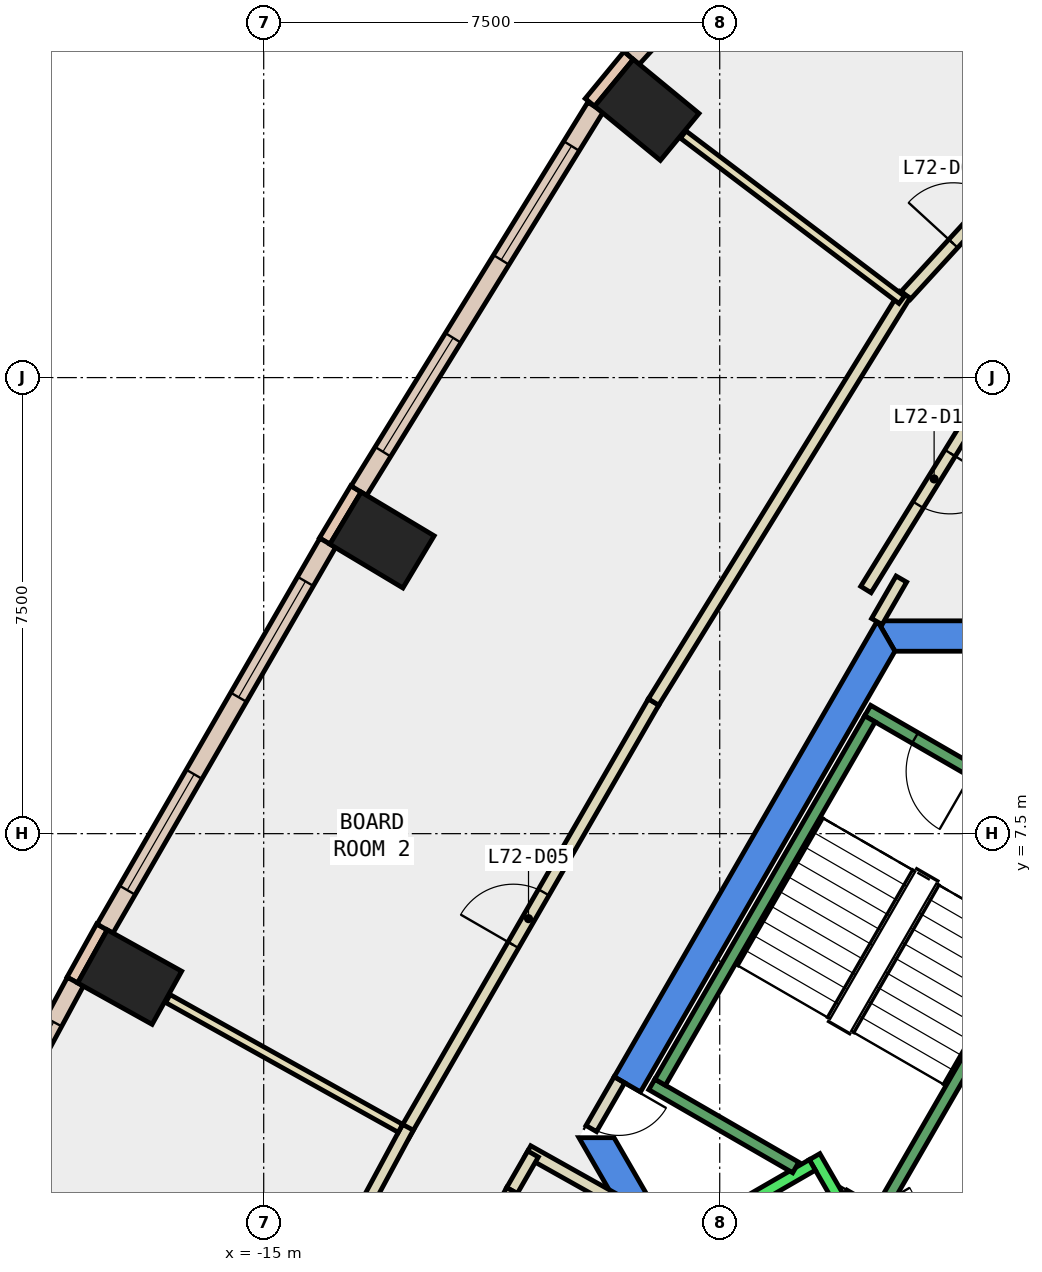
"""IFC4 building model, lengths in metres.
Left out: names, types, materials, properties, quantities, classifications, styles, units other than length and angle.
Written with IfcOpenShell. Run it as: python <this file> out.ifc"""

import sys

from ifc_helpers import new_model, si_unit, direction, frame, frame_2d, origin, origin_2d, place, context, subcontext, project, spatial, polyline, rectangle, outline, extrude, element, fill, save


model = new_model("IFC4")
c1 = context("Model", 3, precision=1e-05, world=origin(), true_north=direction((0.0, 1.0)))
c2 = subcontext(c1, "Body", "Model", "MODEL_VIEW")
j1 = project(units=[si_unit("LENGTHUNIT", "METRE"), si_unit("PLANEANGLEUNIT", "RADIAN")], contexts=[c1])
p1 = place(None, origin())
s1 = spatial("IfcSite", under=j1, at=p1, CompositionType="ELEMENT")
p2 = place(p1, origin())
s2 = spatial("IfcBuilding", under=s1, at=p2, CompositionType="ELEMENT")
p3 = place(p2, frame((0.0, 0.0, 308.0)))
s3 = spatial("IfcBuildingStorey", under=s2, at=p3, CompositionType="ELEMENT", Elevation=308.0)
for number, where, z_axis, x_axis in (
    (1, (-8.699, 19.403, -0.34), (0.0, 0.0, 1.0), (0.636, 0.772, 0.0)),
    (2, (-13.054, 12.329, -0.34), (0.0, 0.0, 1.0), (0.514, 0.858, 0.0)),
    (3, (-17.204, 5.141, -0.34), (0.0, 0.0, 1.0), (0.486, 0.874, 0.0)),
):
    element("IfcColumn", number, at=place(p3, frame(where, z_axis=z_axis, x_axis=x_axis)), inside=s3, PredefinedType="COLUMN", context=c2, shape_type="SweptSolid", body=[
        extrude(rectangle(XDim=1.0, YDim=1.4, at=origin_2d()), origin(), (0.0, 0.0, 1.0), 3.6),
    ])
p4 = place(p3, frame((0.0, 0.0, -0.34)))
e4 = element("IfcWall", 4, at=p4, inside=s3, PredefinedType="SHEAR", context=c2, shape_type="SweptSolid", body=[
    extrude(outline(polyline([(4.907, 11.0), (-4.907, 11.0), (-4.619, 10.5), (4.619, 10.5), (4.907, 11.0)])), origin(), (0.0, 0.0, 1.0), 3.6),
])
p5 = place(p3, frame((0.0, 0.0, -0.34)))
e5 = element("IfcWall", 5, at=p5, inside=s3, PredefinedType="SHEAR", context=c2, shape_type="SweptSolid", body=[
    extrude(outline(polyline([(-9.236, 3.502), (-8.803, 3.253), (-4.619, 10.5), (-4.907, 11.0), (-9.236, 3.502)])), origin(), (0.0, 0.0, 1.0), 3.6),
])
p6 = place(p3, frame((0.0, 0.0, -0.34)))
e6 = element("IfcWall", 6, at=p6, inside=s3, PredefinedType="SHEAR", context=c2, shape_type="SweptSolid", body=[
    extrude(outline(polyline([(-9.815, 2.5), (-4.907, -6.0), (-4.619, -5.5), (-9.238, 2.5), (-9.815, 2.5)])), origin(), (0.0, 0.0, 1.0), 3.6),
])
p7 = place(p3, frame((-8.999, 20.297, 0.0), z_axis=(0.0, 0.0, 1.0), x_axis=(-0.6357329148, -0.77190910154, 0.0)))
e7 = element("IfcWall", 7, at=p7, inside=s3, PredefinedType="STANDARD", context=c2, shape_type="SweptSolid", body=[
    extrude(rectangle(XDim=1.0, YDim=0.2, at=frame_2d((0.5, 0.0))), origin(), (0.0, 0.0, 1.0), 3.26),
])
p8 = place(p3, frame((-13.483, 13.17, 0.0), z_axis=(0.0, 0.0, 1.0), x_axis=(-0.514064933905, -0.857751271482, 0.0)))
e8 = element("IfcWall", 8, at=p8, inside=s3, PredefinedType="STANDARD", context=c2, shape_type="SweptSolid", body=[
    extrude(rectangle(XDim=1.0, YDim=0.2, at=frame_2d((0.5, 0.0))), origin(), (0.0, 0.0, 1.0), 3.26),
])
p9 = place(p3, frame((-17.661, 5.966, 0.0), z_axis=(0.0, 0.0, 1.0), x_axis=(-0.486036693078, -0.873938403425, 0.0)))
e9 = element("IfcWall", 9, at=p9, inside=s3, PredefinedType="STANDARD", context=c2, shape_type="SweptSolid", body=[
    extrude(rectangle(XDim=1.0, YDim=0.2, at=frame_2d((0.5, 0.0))), origin(), (0.0, 0.0, 1.0), 3.26),
])
p10 = place(p3, frame((-5.898, 23.566, 0.0), z_axis=(0.0, 0.0, 1.0), x_axis=(-0.675798306171, -0.737086595575, 0.0)))
e10 = element("IfcWall", 10, at=p10, inside=s3, PredefinedType="STANDARD", context=c2, shape_type="SweptSolid", body=[
    extrude(rectangle(XDim=4.501, YDim=0.3, at=frame_2d((2.25, 0.0))), origin(), (0.0, 0.0, 1.0), 3.26),
])
p11 = place(p10, frame((1.551, 0.0, 0.9)))
e11 = element("IfcOpeningElement", 11, at=p11, cuts=e10, PredefinedType="OPENING", context=c2, shape_type="SweptSolid", body=[
    extrude(rectangle(XDim=1.4, YDim=2.0, at=frame_2d((0.7, 1.0))), frame((0.0, 0.16, 0.0), z_axis=(0.0, -1.0, 0.0), x_axis=(1.0, 0.0, 0.0)), (0.0, 0.0, 1.0), 0.32),
])
p12 = place(p3, frame((-9.542, 19.45, 0.0), z_axis=(0.0, 0.0, 1.0), x_axis=(-0.525070792614, -0.851058554239, 0.0)))
e12 = element("IfcWall", 12, at=p12, inside=s3, PredefinedType="STANDARD", context=c2, shape_type="SweptSolid", body=[
    extrude(rectangle(XDim=7.414, YDim=0.3, at=frame_2d((3.707, 0.0))), origin(), (0.0, 0.0, 1.0), 3.26),
])
p13 = place(p12, frame((0.754, 0.0, 0.9)))
e13 = element("IfcOpeningElement", 13, at=p13, cuts=e12, PredefinedType="OPENING", context=c2, shape_type="SweptSolid", body=[
    extrude(rectangle(XDim=2.2, YDim=2.0, at=frame_2d((1.1, 1.0))), frame((0.0, 0.16, 0.0), z_axis=(0.0, -1.0, 0.0), x_axis=(1.0, 0.0, 0.0)), (0.0, 0.0, 1.0), 0.32),
])
p14 = place(p12, frame((4.461, 0.0, 0.9)))
e14 = element("IfcOpeningElement", 14, at=p14, cuts=e12, PredefinedType="OPENING", context=c2, shape_type="SweptSolid", body=[
    extrude(rectangle(XDim=2.2, YDim=2.0, at=frame_2d((1.1, 1.0))), frame((0.0, 0.16, 0.0), z_axis=(0.0, -1.0, 0.0), x_axis=(1.0, 0.0, 0.0)), (0.0, 0.0, 1.0), 0.32),
])
p15 = place(p3, frame((-13.947, 12.283, 0.0), z_axis=(0.0, 0.0, 1.0), x_axis=(-0.499923391538, -0.866069629183, 0.0)))
e15 = element("IfcWall", 15, at=p15, inside=s3, PredefinedType="STANDARD", context=c2, shape_type="SweptSolid", body=[
    extrude(rectangle(XDim=7.327, YDim=0.3, at=frame_2d((3.664, 0.0))), origin(), (0.0, 0.0, 1.0), 3.26),
])
p16 = place(p15, frame((0.732, 0.0, 0.9)))
e16 = element("IfcOpeningElement", 16, at=p16, cuts=e15, PredefinedType="OPENING", context=c2, shape_type="SweptSolid", body=[
    extrude(rectangle(XDim=2.2, YDim=2.0, at=frame_2d((1.1, 1.0))), frame((0.0, 0.16, 0.0), z_axis=(0.0, -1.0, 0.0), x_axis=(1.0, 0.0, 0.0)), (0.0, 0.0, 1.0), 0.32),
])
p17 = place(p15, frame((4.395, 0.0, 0.9)))
e17 = element("IfcOpeningElement", 17, at=p17, cuts=e15, PredefinedType="OPENING", context=c2, shape_type="SweptSolid", body=[
    extrude(rectangle(XDim=2.2, YDim=2.0, at=frame_2d((1.1, 1.0))), frame((0.0, 0.16, 0.0), z_axis=(0.0, -1.0, 0.0), x_axis=(1.0, 0.0, 0.0)), (0.0, 0.0, 1.0), 0.32),
])
p18 = place(p3, frame((-18.097, 5.066, 0.0), z_axis=(0.0, 0.0, 1.0), x_axis=(-0.474421773145, -0.880297666228, 0.0)))
e18 = element("IfcWall", 18, at=p18, inside=s3, PredefinedType="STANDARD", context=c2, shape_type="SweptSolid", body=[
    extrude(rectangle(XDim=7.416, YDim=0.3, at=frame_2d((3.708, 0.0))), origin(), (0.0, 0.0, 1.0), 3.26),
])
p19 = place(p18, frame((0.754, 0.0, 0.9)))
e19 = element("IfcOpeningElement", 19, at=p19, cuts=e18, PredefinedType="OPENING", context=c2, shape_type="SweptSolid", body=[
    extrude(rectangle(XDim=2.2, YDim=2.0, at=frame_2d((1.1, 1.0))), frame((0.0, 0.16, 0.0), z_axis=(0.0, -1.0, 0.0), x_axis=(1.0, 0.0, 0.0)), (0.0, 0.0, 1.0), 0.32),
])
p20 = place(p18, frame((4.462, 0.0, 0.9)))
e20 = element("IfcOpeningElement", 20, at=p20, cuts=e18, PredefinedType="OPENING", context=c2, shape_type="SweptSolid", body=[
    extrude(rectangle(XDim=2.2, YDim=2.0, at=frame_2d((1.1, 1.0))), frame((0.0, 0.16, 0.0), z_axis=(0.0, -1.0, 0.0), x_axis=(1.0, 0.0, 0.0)), (0.0, 0.0, 1.0), 0.32),
])
p21 = place(p3, frame((-2.852, 15.152, 0.0), z_axis=(0.0, 0.0, 1.0), x_axis=(-0.525050105661, -0.851071316956, 0.0)))
e21 = element("IfcWall", 21, at=p21, inside=s3, PredefinedType="PARTITIONING", context=c2, shape_type="SweptSolid", body=[
    extrude(rectangle(XDim=4.274, YDim=0.2, at=frame_2d((2.137, 0.0))), origin(), (0.0, 0.0, 1.0), 3.26),
])
p22 = place(p21, frame((1.637, 0.0, 0.0)))
e22 = element("IfcOpeningElement", 22, at=p22, cuts=e21, PredefinedType="OPENING", context=c2, shape_type="SweptSolid", body=[
    extrude(rectangle(XDim=1.0, YDim=2.1, at=frame_2d((0.5, 1.05))), frame((0.0, 0.11, 0.0), z_axis=(0.0, -1.0, 0.0), x_axis=(1.0, 0.0, 0.0)), (0.0, 0.0, 1.0), 0.22),
])
p23 = place(p3, frame((-4.513, 11.687, 0.0), z_axis=(0.0, 0.0, 1.0), x_axis=(-0.499556546863, -0.866281280235, 0.0)))
e23 = element("IfcWall", 23, at=p23, inside=s3, PredefinedType="PARTITIONING", context=c2, shape_type="SweptSolid", body=[
    extrude(rectangle(XDim=0.807, YDim=0.2, at=frame_2d((0.403, 0.0))), origin(), (0.0, 0.0, 1.0), 3.26),
])
p24 = place(p3, frame((-9.203, 1.465, 0.0), z_axis=(0.0, 0.0, 1.0), x_axis=(-0.872341127106, 0.488897696823, 0.0)))
e24 = element("IfcWall", 24, at=p24, inside=s3, PredefinedType="PARTITIONING", context=c2, shape_type="SweptSolid", body=[
    extrude(rectangle(XDim=1.667, YDim=0.2, at=frame_2d((0.833, 0.0))), origin(), (0.0, 0.0, 1.0), 3.26),
])
p25 = place(p3, frame((-10.57, 2.232, 0.0), z_axis=(0.0, 0.0, 1.0), x_axis=(-0.500037208726, -0.86600392025, 0.0)))
e25 = element("IfcWall", 25, at=p25, inside=s3, PredefinedType="PARTITIONING", context=c2, shape_type="SweptSolid", body=[
    extrude(rectangle(XDim=0.694, YDim=0.2, at=frame_2d((0.347, 0.0))), origin(), (0.0, 0.0, 1.0), 3.26),
])
p26 = place(p3, frame((-10.917, 1.631, 0.0), z_axis=(0.0, 0.0, 1.0), x_axis=(-0.47449538478, -0.880257990491, 0.0)))
e26 = element("IfcWall", 26, at=p26, inside=s3, PredefinedType="PARTITIONING", context=c2, shape_type="SweptSolid", body=[
    extrude(rectangle(XDim=7.655, YDim=0.2, at=frame_2d((3.827, 0.0))), origin(), (0.0, 0.0, 1.0), 3.26),
])
p27 = place(p26, frame((2.927, 0.0, 0.0)))
e27 = element("IfcOpeningElement", 27, at=p27, cuts=e26, PredefinedType="OPENING", context=c2, shape_type="SweptSolid", body=[
    extrude(rectangle(XDim=1.8, YDim=2.1, at=frame_2d((0.9, 1.05))), frame((0.0, 0.11, 0.0), z_axis=(0.0, -1.0, 0.0), x_axis=(1.0, 0.0, 0.0)), (0.0, 0.0, 1.0), 0.22),
])
p28 = place(p3, frame((-4.439, 16.353, 0.0), z_axis=(0.0, 0.0, 1.0), x_axis=(0.675731313907, 0.737148011871, 0.0)))
e28 = element("IfcWall", 28, at=p28, inside=s3, PredefinedType="PARTITIONING", context=c2, shape_type="SweptSolid", body=[
    extrude(rectangle(XDim=3.307, YDim=0.2, at=frame_2d((1.654, 0.0))), origin(), (0.0, 0.0, 1.0), 3.26),
])
p29 = place(p28, frame((1.154, 0.0, 0.0)))
e29 = element("IfcOpeningElement", 29, at=p29, cuts=e28, PredefinedType="OPENING", context=c2, shape_type="SweptSolid", body=[
    extrude(rectangle(XDim=1.0, YDim=2.1, at=frame_2d((0.5, 1.05))), frame((0.0, 0.11, 0.0), z_axis=(0.0, -1.0, 0.0), x_axis=(1.0, 0.0, 0.0)), (0.0, 0.0, 1.0), 0.22),
])
p30 = place(p3, frame((-12.701, 2.54, 0.0), z_axis=(0.0, 0.0, 1.0), x_axis=(0.499946799636, 0.86605611685, 0.0)))
e30 = element("IfcWall", 30, at=p30, inside=s3, PredefinedType="PARTITIONING", context=c2, shape_type="SweptSolid", body=[
    extrude(rectangle(XDim=8.227, YDim=0.2, at=frame_2d((4.114, 0.0))), origin(), (0.0, 0.0, 1.0), 3.26),
])
p31 = place(p30, frame((3.613, 0.0, 0.0)))
e31 = element("IfcOpeningElement", 31, at=p31, cuts=e30, PredefinedType="OPENING", context=c2, shape_type="SweptSolid", body=[
    extrude(rectangle(XDim=1.0, YDim=2.1, at=frame_2d((0.5, 1.05))), frame((0.0, 0.11, 0.0), z_axis=(0.0, -1.0, 0.0), x_axis=(1.0, 0.0, 0.0)), (0.0, 0.0, 1.0), 0.22),
])
p32 = place(p3, frame((-8.588, 9.665, 0.0), z_axis=(0.0, 0.0, 1.0), x_axis=(0.525142215688, 0.851014484778, 0.0)))
e32 = element("IfcWall", 32, at=p32, inside=s3, PredefinedType="PARTITIONING", context=c2, shape_type="SweptSolid", body=[
    extrude(rectangle(XDim=7.872, YDim=0.2, at=frame_2d((3.936, 0.0))), origin(), (0.0, 0.0, 1.0), 3.26),
])
p33 = place(p3, frame((-16.399, -4.325, 0.0), z_axis=(0.0, 0.0, 1.0), x_axis=(0.474489967676, 0.880260910512, 0.0)))
e33 = element("IfcWall", 33, at=p33, inside=s3, PredefinedType="PARTITIONING", context=c2, shape_type="SweptSolid", body=[
    extrude(rectangle(XDim=7.948, YDim=0.2, at=frame_2d((3.974, 0.0))), origin(), (0.0, 0.0, 1.0), 3.26),
])
p34 = place(p33, frame((3.474, 0.0, 0.0)))
e34 = element("IfcOpeningElement", 34, at=p34, cuts=e33, PredefinedType="OPENING", context=c2, shape_type="SweptSolid", body=[
    extrude(rectangle(XDim=1.0, YDim=2.1, at=frame_2d((0.5, 1.05))), frame((0.0, 0.11, 0.0), z_axis=(0.0, -1.0, 0.0), x_axis=(1.0, 0.0, 0.0)), (0.0, 0.0, 1.0), 0.22),
])
p35 = place(p3, frame((-4.507, 16.279, 0.0), z_axis=(0.0, 0.0, 1.0), x_axis=(-0.797594482062, 0.603194033611, 0.0)))
e35 = element("IfcWall", 35, at=p35, inside=s3, PredefinedType="PARTITIONING", context=c2, shape_type="SweptSolid", body=[
    extrude(rectangle(XDim=4.506, YDim=0.15, at=frame_2d((2.253, 0.0))), origin(), (0.0, 0.0, 1.0), 3.26),
])
p36 = place(p3, frame((-12.751, 2.654, 0.0), z_axis=(0.0, 0.0, 1.0), x_axis=(-0.873277679945, 0.487222837837, 0.0)))
e36 = element("IfcWall", 36, at=p36, inside=s3, PredefinedType="PARTITIONING", context=c2, shape_type="SweptSolid", body=[
    extrude(rectangle(XDim=4.38, YDim=0.15, at=frame_2d((2.19, 0.0))), origin(), (0.0, 0.0, 1.0), 3.26),
])
p37 = place(p3, frame((-9.15, 3.452, 0.0), z_axis=(0.0, 0.0, 1.0), x_axis=(-0.500079945886, -0.865979242085, 0.0)))
e37 = element("IfcWall", 37, at=p37, inside=s3, PredefinedType="PARTITIONING", context=c2, shape_type="SweptSolid", body=[
    extrude(rectangle(XDim=0.926, YDim=0.2, at=frame_2d((0.463, 0.0))), origin(), (0.0, 0.0, 1.0), 2.4),
])
p38 = place(p37, frame((0.017, 0.0, 0.0)))
e38 = element("IfcOpeningElement", 38, at=p38, cuts=e37, PredefinedType="OPENING", context=c2, shape_type="SweptSolid", body=[
    extrude(rectangle(XDim=0.9, YDim=2.1, at=frame_2d((0.45, 1.05))), frame((0.0, 0.11, 0.0), z_axis=(0.0, -1.0, 0.0), x_axis=(1.0, 0.0, 0.0)), (0.0, 0.0, 1.0), 0.22),
])
p39 = place(p3, frame((-5.94, 2.188, 0.0), z_axis=(0.0, 0.0, 1.0), x_axis=(0.500034260056, -0.866005622828, 0.0)))
e39 = element("IfcWall", 39, at=p39, inside=s3, PredefinedType="STANDARD", context=c2, shape_type="SweptSolid", body=[
    extrude(rectangle(XDim=5.399, YDim=0.2, at=frame_2d((2.7, 0.0))), origin(), (0.0, 0.0, 1.0), 3.26),
])
p40 = place(p39, frame((3.075, 0.0, 0.0)))
e40 = element("IfcOpeningElement", 40, at=p40, cuts=e39, PredefinedType="OPENING", context=c2, shape_type="SweptSolid", body=[
    extrude(rectangle(XDim=1.1, YDim=2.1, at=frame_2d((0.55, 1.05))), frame((0.0, 0.11, 0.0), z_axis=(0.0, -1.0, 0.0), x_axis=(1.0, 0.0, 0.0)), (0.0, 0.0, 1.0), 0.22),
])
p41 = place(p39, frame((1.225, 0.0, 0.0)))
e41 = element("IfcOpeningElement", 41, at=p41, cuts=e39, PredefinedType="OPENING", context=c2, shape_type="SweptSolid", body=[
    extrude(rectangle(XDim=1.1, YDim=2.1, at=frame_2d((0.55, 1.05))), frame((0.0, 0.11, 0.0), z_axis=(0.0, -1.0, 0.0), x_axis=(1.0, 0.0, 0.0)), (0.0, 0.0, 1.0), 0.22),
])
p42 = place(p3, frame((-5.977, 2.052, 0.0), z_axis=(0.0, 0.0, 1.0), x_axis=(-0.865973769406, -0.500089422704, 0.0)))
e42 = element("IfcWall", 42, at=p42, inside=s3, PredefinedType="STANDARD", context=c2, shape_type="SweptSolid", body=[
    extrude(rectangle(XDim=2.399, YDim=0.2, at=frame_2d((1.2, 0.0))), origin(), (0.0, 0.0, 1.0), 3.26),
])
p43 = place(p3, frame((-1.256, 7.324, 0.0), z_axis=(0.0, 0.0, 1.0), x_axis=(-0.866046073146, 0.499964197906, 0.0)))
e43 = element("IfcWall", 43, at=p43, inside=s3, PredefinedType="STANDARD", context=c2, shape_type="SweptSolid", body=[
    extrude(rectangle(XDim=4.4, YDim=0.2, at=frame_2d((2.2, 0.0))), origin(), (0.0, 0.0, 1.0), 3.26),
])
p44 = place(p43, frame((2.4, 0.0, 0.0)))
e44 = element("IfcOpeningElement", 44, at=p44, cuts=e43, PredefinedType="OPENING", context=c2, shape_type="SweptSolid", body=[
    extrude(rectangle(XDim=1.1, YDim=2.2, at=frame_2d((0.55, 1.1))), frame((0.0, 0.11, 0.0), z_axis=(0.0, -1.0, 0.0), x_axis=(1.0, 0.0, 0.0)), (0.0, 0.0, 1.0), 0.22),
])
p45 = place(p3, frame((-6.25, 2.01, 0.0), z_axis=(0.0, 0.0, 1.0), x_axis=(-0.86611865017, 0.499838457731, 0.0)))
e45 = element("IfcWall", 45, at=p45, inside=s3, PredefinedType="STANDARD", context=c2, shape_type="SweptSolid", body=[
    extrude(rectangle(XDim=2.733, YDim=0.2, at=frame_2d((1.366, 0.0))), origin(), (0.0, 0.0, 1.0), 3.26),
])
p46 = place(p3, frame((-4.806, 1.176, 0.0), z_axis=(0.0, 0.0, 1.0), x_axis=(-0.866558586415, 0.499075361355, 0.0)))
e46 = element("IfcWall", 46, at=p46, inside=s3, PredefinedType="STANDARD", context=c2, shape_type="SweptSolid", body=[
    extrude(rectangle(XDim=0.751, YDim=0.2, at=frame_2d((0.376, 0.0))), origin(), (0.0, 0.0, 1.0), 3.26),
])
p47 = place(p3, frame((-1.393, 7.288, 0.0), z_axis=(0.0, 0.0, 1.0), x_axis=(-0.499963383562, -0.866046543262, 0.0)))
e47 = element("IfcWall", 47, at=p47, inside=s3, PredefinedType="STANDARD", context=c2, shape_type="SweptSolid", body=[
    extrude(rectangle(XDim=6.9, YDim=0.2, at=frame_2d((3.45, 0.0))), origin(), (0.0, 0.0, 1.0), 3.26),
])
p48 = place(p47, frame((0.45, 0.0, 0.0)))
e48 = element("IfcOpeningElement", 48, at=p48, cuts=e47, PredefinedType="OPENING", context=c2, shape_type="SweptSolid", body=[
    extrude(rectangle(XDim=1.1, YDim=2.2, at=frame_2d((0.55, 1.1))), frame((0.0, 0.11, 0.0), z_axis=(0.0, -1.0, 0.0), x_axis=(1.0, 0.0, 0.0)), (0.0, 0.0, 1.0), 0.22),
])
p49 = place(p3, frame((-5.03, 9.388, 0.0), z_axis=(0.0, 0.0, 1.0), x_axis=(-0.499978703459, -0.866037698999, 0.0)))
e49 = element("IfcWall", 49, at=p49, inside=s3, PredefinedType="STANDARD", context=c2, shape_type="SweptSolid", body=[
    extrude(rectangle(XDim=6.9, YDim=0.2, at=frame_2d((3.45, 0.0))), origin(), (0.0, 0.0, 1.0), 3.26),
])
p50 = place(p13, origin())
e50 = element("IfcWindow", 50, at=p50, inside=s3, PartitioningType="SINGLE_PANEL", PredefinedType="WINDOW", context=c2, shape_type="SweptSolid", body=[
    extrude(rectangle(XDim=2.2, YDim=2.0, at=frame_2d((1.1, 1.0))), frame((0.0, 0.03, 0.0), z_axis=(0.0, -1.0, 0.0), x_axis=(1.0, 0.0, 0.0)), (0.0, 0.0, 1.0), 0.06),
])
fill(e13, e50)
p51 = place(p14, origin())
e51 = element("IfcWindow", 51, at=p51, inside=s3, PartitioningType="SINGLE_PANEL", PredefinedType="WINDOW", context=c2, shape_type="SweptSolid", body=[
    extrude(rectangle(XDim=2.2, YDim=2.0, at=frame_2d((1.1, 1.0))), frame((0.0, 0.03, 0.0), z_axis=(0.0, -1.0, 0.0), x_axis=(1.0, 0.0, 0.0)), (0.0, 0.0, 1.0), 0.06),
])
fill(e14, e51)
p52 = place(p16, origin())
e52 = element("IfcWindow", 52, at=p52, inside=s3, PartitioningType="SINGLE_PANEL", PredefinedType="WINDOW", context=c2, shape_type="SweptSolid", body=[
    extrude(rectangle(XDim=2.2, YDim=2.0, at=frame_2d((1.1, 1.0))), frame((0.0, 0.03, 0.0), z_axis=(0.0, -1.0, 0.0), x_axis=(1.0, 0.0, 0.0)), (0.0, 0.0, 1.0), 0.06),
])
fill(e16, e52)
p53 = place(p17, origin())
e53 = element("IfcWindow", 53, at=p53, inside=s3, PartitioningType="SINGLE_PANEL", PredefinedType="WINDOW", context=c2, shape_type="SweptSolid", body=[
    extrude(rectangle(XDim=2.2, YDim=2.0, at=frame_2d((1.1, 1.0))), frame((0.0, 0.03, 0.0), z_axis=(0.0, -1.0, 0.0), x_axis=(1.0, 0.0, 0.0)), (0.0, 0.0, 1.0), 0.06),
])
fill(e17, e53)
p54 = place(p19, origin())
e54 = element("IfcWindow", 54, at=p54, inside=s3, PartitioningType="SINGLE_PANEL", PredefinedType="WINDOW", context=c2, shape_type="SweptSolid", body=[
    extrude(rectangle(XDim=2.2, YDim=2.0, at=frame_2d((1.1, 1.0))), frame((0.0, 0.03, 0.0), z_axis=(0.0, -1.0, 0.0), x_axis=(1.0, 0.0, 0.0)), (0.0, 0.0, 1.0), 0.06),
])
fill(e19, e54)
p55 = place(p29, origin())
e55 = element("IfcDoor", 55, at=p55, inside=s3, OperationType="SINGLE_SWING_LEFT", PredefinedType="DOOR", context=c2, shape_type="SweptSolid", body=[
    extrude(rectangle(XDim=1.0, YDim=2.1, at=frame_2d((0.5, 1.05))), frame((0.0, 0.025, 0.0), z_axis=(0.0, -1.0, 0.0), x_axis=(1.0, 0.0, 0.0)), (0.0, 0.0, 1.0), 0.05),
])
fill(e29, e55)
p56 = place(p31, origin())
e56 = element("IfcDoor", 56, at=p56, inside=s3, OperationType="SINGLE_SWING_RIGHT", PredefinedType="DOOR", context=c2, shape_type="SweptSolid", body=[
    extrude(rectangle(XDim=1.0, YDim=2.1, at=frame_2d((0.5, 1.05))), frame((0.0, 0.025, 0.0), z_axis=(0.0, -1.0, 0.0), x_axis=(1.0, 0.0, 0.0)), (0.0, 0.0, 1.0), 0.05),
])
fill(e31, e56)
p57 = place(p22, origin())
e57 = element("IfcDoor", 57, at=p57, inside=s3, OperationType="SINGLE_SWING_LEFT", PredefinedType="DOOR", context=c2, shape_type="SweptSolid", body=[
    extrude(rectangle(XDim=1.0, YDim=2.1, at=frame_2d((0.5, 1.05))), frame((0.0, 0.025, 0.0), z_axis=(0.0, -1.0, 0.0), x_axis=(1.0, 0.0, 0.0)), (0.0, 0.0, 1.0), 0.05),
])
fill(e22, e57)
p58 = place(p38, origin())
e58 = element("IfcDoor", 58, at=p58, inside=s3, OperationType="SINGLE_SWING_LEFT", PredefinedType="DOOR", context=c2, shape_type="SweptSolid", body=[
    extrude(rectangle(XDim=0.9, YDim=2.1, at=frame_2d((0.45, 1.05))), frame((0.0, 0.025, 0.0), z_axis=(0.0, -1.0, 0.0), x_axis=(1.0, 0.0, 0.0)), (0.0, 0.0, 1.0), 0.05),
])
fill(e38, e58)
p59 = place(p44, origin())
e59 = element("IfcDoor", 59, at=p59, inside=s3, OperationType="SINGLE_SWING_LEFT", PredefinedType="DOOR", context=c2, shape_type="SweptSolid", body=[
    extrude(rectangle(XDim=1.1, YDim=2.2, at=frame_2d((0.55, 1.1))), frame((0.0, 0.025, 0.0), z_axis=(0.0, -1.0, 0.0), x_axis=(1.0, 0.0, 0.0)), (0.0, 0.0, 1.0), 0.05),
])
fill(e44, e59)
save(model, sys.argv[1])
